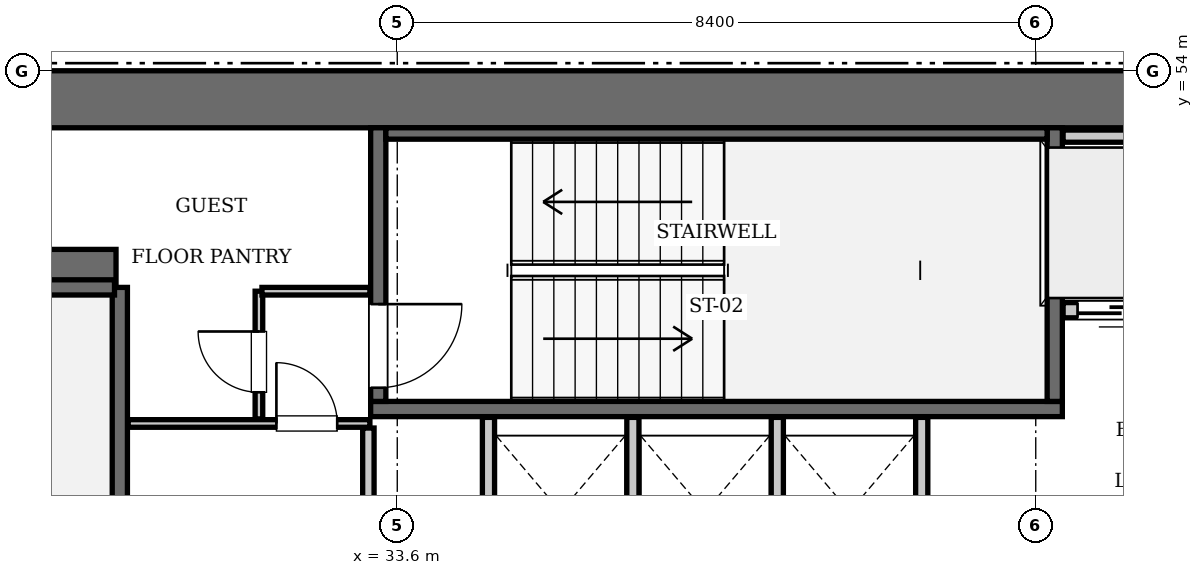
"""IFC4 building model, lengths in metres.
Left out: names, types, materials, properties, quantities, classifications, styles, units other than length and angle.
Written with IfcOpenShell. Run it as: python <this file> out.ifc"""

import sys

from ifc_helpers import new_model, si_unit, direction, frame, frame_2d, origin, place, context, subcontext, project, spatial, rectangle, extrude, element, fill, save


model = new_model("IFC4")
c1 = context("Model", 3, precision=1e-05, world=origin(), true_north=direction((0.0, 1.0)))
c2 = subcontext(c1, "Body", "Model", "MODEL_VIEW")
j1 = project(units=[si_unit("LENGTHUNIT", "METRE"), si_unit("PLANEANGLEUNIT", "RADIAN")], contexts=[c1])
p1 = place(None, origin())
s1 = spatial("IfcSite", under=j1, at=p1, CompositionType="ELEMENT")
p2 = place(p1, origin())
s2 = spatial("IfcBuilding", under=s1, at=p2, CompositionType="ELEMENT")
p3 = place(p2, frame((0.0, 0.0, 189.0)))
s3 = spatial("IfcBuildingStorey", under=s2, at=p3, CompositionType="ELEMENT", Elevation=189.0)
p4 = place(p3, frame((25.2, 53.625, 0.0), z_axis=(0.0, 0.0, 1.0), x_axis=(1.0, 0.0, 0.0)))
e1 = element("IfcWall", 1, at=p4, inside=s3, PredefinedType="SHEAR", context=c2, shape_type="SweptSolid", body=[
    extrude(rectangle(XDim=25.2, YDim=0.75, at=frame_2d((12.6, 0.0))), origin(), (0.0, 0.0, 1.0), 3.85),
])
p5 = place(p3, frame((25.95, 51.4, 0.0), z_axis=(0.0, 0.0, 1.0), x_axis=(1.0, 0.0, 0.0)))
e2 = element("IfcWall", 2, at=p5, inside=s3, PredefinedType="SHEAR", context=c2, shape_type="SweptSolid", body=[
    extrude(rectangle(XDim=3.95, YDim=0.5, at=frame_2d((1.975, 0.0))), origin(), (0.0, 0.0, 1.0), 3.85),
])
p6 = place(p3, frame((29.95, 42.15, 0.0), z_axis=(0.0, 0.0, 1.0), x_axis=(0.0, 1.0, 0.0)))
e3 = element("IfcWall", 3, at=p6, inside=s3, PredefinedType="SOLIDWALL", context=c2, shape_type="SweptSolid", body=[
    extrude(rectangle(XDim=9.0, YDim=0.2, at=frame_2d((4.5, 0.0))), origin(), (0.0, 0.0, 1.0), 3.61),
])
p7 = place(p3, frame((26.38, 51.15, 0.0), z_axis=(0.0, 0.0, 1.0), x_axis=(1.0, 0.0, 0.0)))
e4 = element("IfcWall", 4, at=p7, inside=s3, PredefinedType="SOLIDWALL", context=c2, shape_type="SweptSolid", body=[
    extrude(rectangle(XDim=3.5, YDim=0.2, at=frame_2d((1.75, 0.0))), origin(), (0.0, 0.0, 1.0), 3.61),
])
p8 = place(p3, frame((33.25, 49.55, 0.0), z_axis=(0.0, 0.0, 1.0), x_axis=(1.0, 0.0, 0.0)))
e5 = element("IfcWall", 5, at=p8, inside=s3, PredefinedType="SOLIDWALL", context=c2, shape_type="SweptSolid", body=[
    extrude(rectangle(XDim=9.1, YDim=0.2, at=frame_2d((4.55, 0.0))), origin(), (0.0, 0.0, 1.0), 3.61),
])
p9 = place(p3, frame((42.25, 49.65, 0.0), z_axis=(0.0, 0.0, 1.0), x_axis=(0.0, 1.0, 0.0)))
e6 = element("IfcWall", 6, at=p9, inside=s3, PredefinedType="SOLIDWALL", context=c2, shape_type="SweptSolid", body=[
    extrude(rectangle(XDim=3.6, YDim=0.2, at=frame_2d((1.8, 0.0))), origin(), (0.0, 0.0, 1.0), 3.61),
])
p10 = place(p3, frame((33.35, 49.65, 0.0), z_axis=(0.0, 0.0, 1.0), x_axis=(0.0, 1.0, 0.0)))
e7 = element("IfcWall", 7, at=p10, inside=s3, PredefinedType="SOLIDWALL", context=c2, shape_type="SweptSolid", body=[
    extrude(rectangle(XDim=3.6, YDim=0.2, at=frame_2d((1.8, 0.0))), origin(), (0.0, 0.0, 1.0), 3.61),
])
p11 = place(p10, frame((0.18, 0.0, 0.0)))
e8 = element("IfcOpeningElement", 8, at=p11, cuts=e7, PredefinedType="OPENING", context=c2, shape_type="SweptSolid", body=[
    extrude(rectangle(XDim=1.1, YDim=2.15, at=frame_2d((0.55, 1.075))), frame((0.0, 0.11, 0.0), z_axis=(0.0, -1.0, 0.0), x_axis=(1.0, 0.0, 0.0)), (0.0, 0.0, 1.0), 0.22),
])
p12 = place(p3, frame((33.45, 53.175, 0.0), z_axis=(0.0, 0.0, 1.0), x_axis=(1.0, 0.0, 0.0)))
e9 = element("IfcWall", 9, at=p12, inside=s3, PredefinedType="SOLIDWALL", context=c2, shape_type="SweptSolid", body=[
    extrude(rectangle(XDim=8.7, YDim=0.15, at=frame_2d((4.35, 0.0))), origin(), (0.0, 0.0, 1.0), 3.61),
])
p13 = place(p3, frame((42.36, 50.85, 0.0), z_axis=(0.0, 0.0, 1.0), x_axis=(1.0, 0.0, 0.0)))
e10 = element("IfcWall", 10, at=p13, inside=s3, PredefinedType="SOLIDWALL", context=c2, shape_type="SweptSolid", body=[
    extrude(rectangle(XDim=1.38, YDim=0.2, at=frame_2d((0.69, 0.0))), origin(), (0.0, 0.0, 1.0), 3.61),
])
p14 = place(p13, frame((0.19, 0.0, 0.0)))
e11 = element("IfcOpeningElement", 11, at=p14, cuts=e10, PredefinedType="OPENING", context=c2, shape_type="SweptSolid", body=[
    extrude(rectangle(XDim=1.0, YDim=2.15, at=frame_2d((0.5, 1.075))), frame((0.0, 0.11, 0.0), z_axis=(0.0, -1.0, 0.0), x_axis=(1.0, 0.0, 0.0)), (0.0, 0.0, 1.0), 0.22),
])
p15 = place(p3, frame((42.36, 53.14, 0.0), z_axis=(0.0, 0.0, 1.0), x_axis=(1.0, 0.0, 0.0)))
e12 = element("IfcWall", 12, at=p15, inside=s3, PredefinedType="SOLIDWALL", context=c2, shape_type="SweptSolid", body=[
    extrude(rectangle(XDim=3.14, YDim=0.16, at=frame_2d((1.57, 0.0))), origin(), (0.0, 0.0, 1.0), 3.61),
])
for number, where, z_axis, x_axis in (
    (13, (34.8, 47.25, 0.0), (0.0, 0.0, 1.0), (0.0, 1.0, 0.0)),
    (14, (36.7, 47.25, 0.0), (0.0, 0.0, 1.0), (0.0, 1.0, 0.0)),
    (15, (38.6, 47.25, 0.0), (0.0, 0.0, 1.0), (0.0, 1.0, 0.0)),
    (16, (40.5, 47.25, 0.0), (0.0, 0.0, 1.0), (0.0, 1.0, 0.0)),
):
    element("IfcWall", number, at=place(p3, frame(where, z_axis=z_axis, x_axis=x_axis)), inside=s3, PredefinedType="SOLIDWALL", context=c2, shape_type="SweptSolid", body=[
        extrude(rectangle(XDim=2.19, YDim=0.16, at=frame_2d((1.095, 0.0))), origin(), (0.0, 0.0, 1.0), 3.61),
    ])
p16 = place(p3, frame((33.22, 45.14, 0.0), z_axis=(0.0, 0.0, 1.0), x_axis=(0.0, 1.0, 0.0)))
e17 = element("IfcWall", 17, at=p16, inside=s3, PredefinedType="PARTITIONING", context=c2, shape_type="SweptSolid", body=[
    extrude(rectangle(XDim=4.16, YDim=0.15, at=frame_2d((2.08, 0.0))), origin(), (0.0, 0.0, 1.0), 3.61),
])
p17 = place(p3, frame((30.06, 49.36, 0.0), z_axis=(0.0, 0.0, 1.0), x_axis=(1.0, 0.0, 0.0)))
e18 = element("IfcWall", 18, at=p17, inside=s3, PredefinedType="PARTITIONING", context=c2, shape_type="SweptSolid", body=[
    extrude(rectangle(XDim=3.18, YDim=0.1, at=frame_2d((1.59, 0.0))), origin(), (0.0, 0.0, 1.0), 3.61),
])
p18 = place(p17, frame((1.95, 0.0, 0.0)))
e19 = element("IfcOpeningElement", 19, at=p18, cuts=e18, PredefinedType="OPENING", context=c2, shape_type="SweptSolid", body=[
    extrude(rectangle(XDim=0.8, YDim=2.05, at=frame_2d((0.4, 1.025))), frame((0.0, 0.06, 0.0), z_axis=(0.0, -1.0, 0.0), x_axis=(1.0, 0.0, 0.0)), (0.0, 0.0, 1.0), 0.12),
])
p19 = place(p3, frame((31.78, 49.42, 0.0), z_axis=(0.0, 0.0, 1.0), x_axis=(0.0, 1.0, 0.0)))
e20 = element("IfcWall", 20, at=p19, inside=s3, PredefinedType="PARTITIONING", context=c2, shape_type="SweptSolid", body=[
    extrude(rectangle(XDim=1.68, YDim=0.1, at=frame_2d((0.84, 0.0))), origin(), (0.0, 0.0, 1.0), 3.61),
])
p20 = place(p19, frame((0.35, 0.0, 0.0)))
e21 = element("IfcOpeningElement", 21, at=p20, cuts=e20, PredefinedType="OPENING", context=c2, shape_type="SweptSolid", body=[
    extrude(rectangle(XDim=0.8, YDim=2.05, at=frame_2d((0.4, 1.025))), frame((0.0, 0.06, 0.0), z_axis=(0.0, -1.0, 0.0), x_axis=(1.0, 0.0, 0.0)), (0.0, 0.0, 1.0), 0.12),
])
p21 = place(p3, frame((31.82, 51.1, 0.0), z_axis=(0.0, 0.0, 1.0), x_axis=(1.0, 0.0, 0.0)))
e22 = element("IfcWall", 22, at=p21, inside=s3, PredefinedType="PARTITIONING", context=c2, shape_type="SweptSolid", body=[
    extrude(rectangle(XDim=1.42, YDim=0.1, at=frame_2d((0.71, 0.0))), origin(), (0.0, 0.0, 1.0), 3.61),
])
p22 = place(p11, frame((1.1, 0.0, 0.0), z_axis=(0.0, 0.0, 1.0), x_axis=(-1.0, 0.0, 0.0)))
e23 = element("IfcDoor", 23, at=p22, inside=s3, OperationType="SINGLE_SWING_LEFT", PredefinedType="DOOR", context=c2, shape_type="SweptSolid", body=[
    extrude(rectangle(XDim=1.1, YDim=2.15, at=frame_2d((0.55, 1.075))), frame((0.0, 0.025, 0.0), z_axis=(0.0, -1.0, 0.0), x_axis=(1.0, 0.0, 0.0)), (0.0, 0.0, 1.0), 0.05),
])
fill(e8, e23)
p23 = place(p14, frame((1.0, 0.0, 0.0), z_axis=(0.0, 0.0, 1.0), x_axis=(-1.0, 0.0, 0.0)))
e24 = element("IfcDoor", 24, at=p23, inside=s3, OperationType="SLIDING_TO_LEFT", PredefinedType="DOOR", context=c2, shape_type="SweptSolid", body=[
    extrude(rectangle(XDim=1.0, YDim=2.15, at=frame_2d((0.5, 1.075))), frame((0.0, 0.025, 0.0), z_axis=(0.0, -1.0, 0.0), x_axis=(1.0, 0.0, 0.0)), (0.0, 0.0, 1.0), 0.05),
])
fill(e11, e24)
p24 = place(p18, origin())
e25 = element("IfcDoor", 25, at=p24, inside=s3, OperationType="SINGLE_SWING_LEFT", PredefinedType="DOOR", context=c2, shape_type="SweptSolid", body=[
    extrude(rectangle(XDim=0.8, YDim=2.05, at=frame_2d((0.4, 1.025))), frame((0.0, 0.025, 0.0), z_axis=(0.0, -1.0, 0.0), x_axis=(1.0, 0.0, 0.0)), (0.0, 0.0, 1.0), 0.05),
])
fill(e19, e25)
p25 = place(p20, origin())
e26 = element("IfcDoor", 26, at=p25, inside=s3, OperationType="SINGLE_SWING_RIGHT", PredefinedType="DOOR", context=c2, shape_type="SweptSolid", body=[
    extrude(rectangle(XDim=0.8, YDim=2.05, at=frame_2d((0.4, 1.025))), frame((0.0, 0.025, 0.0), z_axis=(0.0, -1.0, 0.0), x_axis=(1.0, 0.0, 0.0)), (0.0, 0.0, 1.0), 0.05),
])
fill(e21, e26)
save(model, sys.argv[1])
